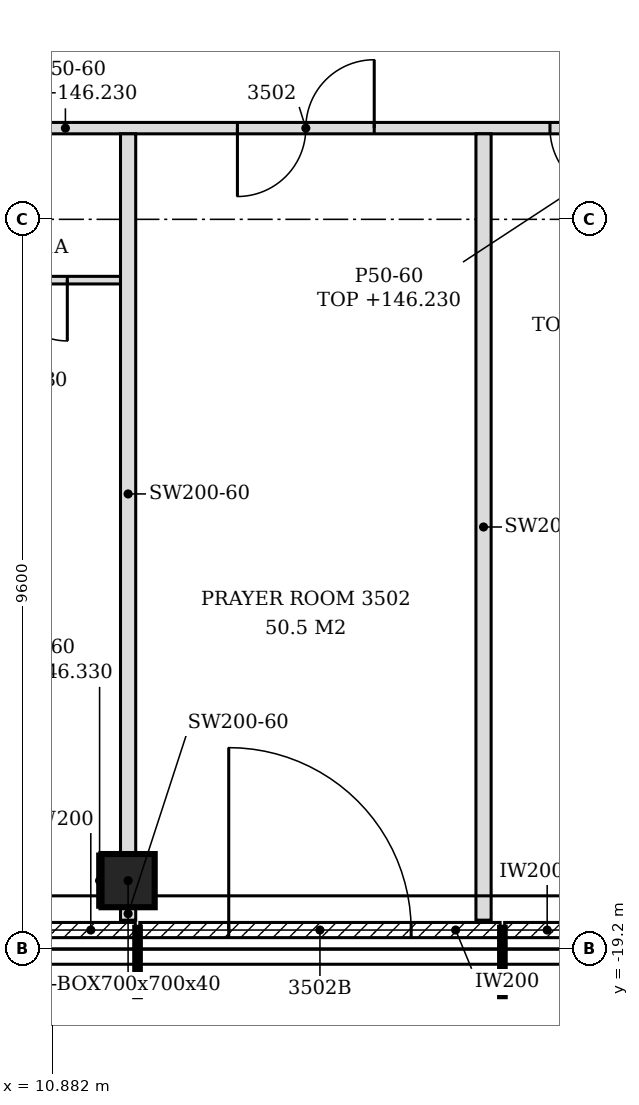
"""IFC4 building model, lengths in metres.
Left out: names, types, materials, properties, quantities, classifications, styles, units other than length and angle.
Written with IfcOpenShell. Run it as: python <this file> out.ifc"""

import sys

from ifc_helpers import new_model, si_unit, direction, frame, frame_2d, origin, origin_2d, place, context, subcontext, project, spatial, polyline, rectangle, hollow_rectangle, outline, extrude, element, fill, save


model = new_model("IFC4")
c1 = context("Model", 3, precision=1e-05, world=origin(), true_north=direction((0.0, 1.0)))
c2 = subcontext(c1, "Body", "Model", "MODEL_VIEW")
j1 = project(units=[si_unit("LENGTHUNIT", "METRE"), si_unit("PLANEANGLEUNIT", "RADIAN")], contexts=[c1])
p1 = place(None, origin())
s1 = spatial("IfcSite", under=j1, at=p1, CompositionType="ELEMENT")
p2 = place(p1, origin())
s2 = spatial("IfcBuilding", under=s1, at=p2, CompositionType="ELEMENT")
p3 = place(p2, frame((0.0, 0.0, 143.4)))
s3 = spatial("IfcBuildingStorey", under=s2, at=p3, CompositionType="ELEMENT", Elevation=143.4)
p4 = place(p3, frame((11.876, -18.3, -0.15), z_axis=(0.0, 0.0, 1.0), x_axis=(1.0, 0.0, 0.0)))
e1 = element("IfcColumn", 1, at=p4, inside=s3, PredefinedType="COLUMN", context=c2, shape_type="SweptSolid", body=[
    extrude(hollow_rectangle(XDim=0.7, YDim=0.7, WallThickness=0.04, at=origin_2d()), origin(), (0.0, 0.0, 1.0), 3.6),
])
p5 = place(p3, frame((7.23, -18.95, 0.0), z_axis=(0.0, 0.0, 1.0), x_axis=(1.0, 0.0, 0.0)))
e2 = element("IfcWall", 2, at=p5, inside=s3, PredefinedType="NOTDEFINED", context=c2, shape_type="SweptSolid", body=[
    extrude(rectangle(XDim=4.74, YDim=0.2, at=frame_2d((2.37, 0.0))), origin(), (0.0, 0.0, 1.0), 3.45),
])
p6 = place(p5, frame((1.17, 0.0, 0.0)))
e3 = element("IfcOpeningElement", 3, at=p6, cuts=e2, PredefinedType="OPENING", context=c2, shape_type="SweptSolid", body=[
    extrude(rectangle(XDim=2.4, YDim=2.4, at=frame_2d((1.2, 1.2))), frame((0.0, 0.11, 0.0), z_axis=(0.0, -1.0, 0.0), x_axis=(1.0, 0.0, 0.0)), (0.0, 0.0, 1.0), 0.22),
])
p7 = place(p3, frame((12.03, -18.95, 0.0), z_axis=(0.0, 0.0, 1.0), x_axis=(1.0, 0.0, 0.0)))
e4 = element("IfcWall", 4, at=p7, inside=s3, PredefinedType="NOTDEFINED", context=c2, shape_type="SweptSolid", body=[
    extrude(rectangle(XDim=4.74, YDim=0.2, at=frame_2d((2.37, 0.0))), origin(), (0.0, 0.0, 1.0), 3.45),
])
p8 = place(p7, frame((1.17, 0.0, 0.0)))
e5 = element("IfcOpeningElement", 5, at=p8, cuts=e4, PredefinedType="OPENING", context=c2, shape_type="SweptSolid", body=[
    extrude(rectangle(XDim=2.4, YDim=2.4, at=frame_2d((1.2, 1.2))), frame((0.0, 0.11, 0.0), z_axis=(0.0, -1.0, 0.0), x_axis=(1.0, 0.0, 0.0)), (0.0, 0.0, 1.0), 0.22),
])
p9 = place(p3, frame((16.83, -18.95, 0.0), z_axis=(0.0, 0.0, 1.0), x_axis=(1.0, 0.0, 0.0)))
e6 = element("IfcWall", 6, at=p9, inside=s3, PredefinedType="NOTDEFINED", context=c2, shape_type="SweptSolid", body=[
    extrude(rectangle(XDim=4.626, YDim=0.2, at=frame_2d((2.313, 0.0))), origin(), (0.0, 0.0, 1.0), 3.45),
])
p10 = place(p9, frame((1.118, 0.0, 0.0)))
e7 = element("IfcOpeningElement", 7, at=p10, cuts=e6, PredefinedType="OPENING", context=c2, shape_type="SweptSolid", body=[
    extrude(rectangle(XDim=2.4, YDim=2.4, at=frame_2d((1.2, 1.2))), frame((0.0, 0.11, 0.0), z_axis=(0.0, -1.0, 0.0), x_axis=(1.0, 0.0, 0.0)), (0.0, 0.0, 1.0), 0.22),
])
p11 = place(p3, frame((11.876, -18.82, 0.0), z_axis=(0.0, 0.0, 1.0), x_axis=(0.0, 1.0, 0.0)))
e8 = element("IfcWall", 8, at=p11, inside=s3, PredefinedType="PARTITIONING", context=c2, shape_type="SweptSolid", body=[
    extrude(rectangle(XDim=0.17, YDim=0.2, at=frame_2d((0.085, 0.0))), origin(), (0.0, 0.0, 1.0), 3.45),
])
p12 = place(p3, frame((16.552, -18.82, 0.0), z_axis=(0.0, 0.0, 1.0), x_axis=(0.0, 1.0, 0.0)))
e9 = element("IfcWall", 9, at=p12, inside=s3, PredefinedType="PARTITIONING", context=c2, shape_type="SweptSolid", body=[
    extrude(outline(polyline([(0.0, 0.0), (10.345, 0.0), (10.345, 2.83), (10.27, 2.83), (10.268, 3.45), (4.525, 3.45), (4.523, 2.88), (4.315, 2.88), (4.313, 3.45), (0.67, 3.45), (0.668, 2.93), (0.37, 2.93), (0.368, 3.45), (0.0, 3.45), (0.0, 0.0)])), frame((0.0, 0.1, 0.0), z_axis=(0.0, -1.0, 0.0), x_axis=(1.0, 0.0, 0.0)), (0.0, 0.0, 1.0), 0.2),
])
p13 = place(p3, frame((11.876, -17.95, 0.0), z_axis=(0.0, 0.0, 1.0), x_axis=(0.0, 1.0, 0.0)))
e10 = element("IfcWall", 10, at=p13, inside=s3, PredefinedType="PARTITIONING", context=c2, shape_type="SweptSolid", body=[
    extrude(outline(polyline([(0.0, 0.0), (9.475, 0.0), (9.475, 2.83), (9.4, 2.83), (9.398, 3.45), (3.655, 3.45), (3.653, 2.88), (3.445, 2.88), (3.443, 3.45), (0.0, 3.45), (0.0, 0.0)])), frame((0.0, 0.1, 0.0), z_axis=(0.0, -1.0, 0.0), x_axis=(1.0, 0.0, 0.0)), (0.0, 0.0, 1.0), 0.2),
])
p14 = place(p3, frame((9.426, -10.4, 0.0), z_axis=(0.0, 0.0, 1.0), x_axis=(1.0, 0.0, 0.0)))
e11 = element("IfcWall", 11, at=p14, inside=s3, PredefinedType="PARTITIONING", context=c2, shape_type="SweptSolid", body=[
    extrude(rectangle(XDim=2.35, YDim=0.1, at=frame_2d((1.175, 0.0))), origin(), (0.0, 0.0, 1.0), 3.45),
])
p15 = place(p14, frame((0.85, 0.0, 0.0)))
e12 = element("IfcOpeningElement", 12, at=p15, cuts=e11, PredefinedType="OPENING", context=c2, shape_type="SweptSolid", body=[
    extrude(rectangle(XDim=0.8, YDim=2.1, at=frame_2d((0.4, 1.05))), frame((0.0, 0.06, 0.0), z_axis=(0.0, -1.0, 0.0), x_axis=(1.0, 0.0, 0.0)), (0.0, 0.0, 1.0), 0.12),
])
p16 = place(p3, frame((7.405, -8.4, 0.0), z_axis=(0.0, 0.0, 1.0), x_axis=(1.0, 0.0, 0.0)))
e13 = element("IfcWall", 13, at=p16, inside=s3, PredefinedType="PARTITIONING", context=c2, shape_type="SweptSolid", body=[
    extrude(rectangle(XDim=11.591, YDim=0.15, at=frame_2d((5.795, 0.0))), origin(), (0.0, 0.0, 1.0), 2.83),
])
p17 = place(p16, frame((0.483, 0.0, 0.0)))
e14 = element("IfcOpeningElement", 14, at=p17, cuts=e13, PredefinedType="OPENING", context=c2, shape_type="SweptSolid", body=[
    extrude(rectangle(XDim=0.9, YDim=2.1, at=frame_2d((0.45, 1.05))), frame((0.0, 0.085, 0.0), z_axis=(0.0, -1.0, 0.0), x_axis=(1.0, 0.0, 0.0)), (0.0, 0.0, 1.0), 0.17),
])
p18 = place(p16, frame((5.909, 0.0, 0.0)))
e15 = element("IfcOpeningElement", 15, at=p18, cuts=e13, PredefinedType="OPENING", context=c2, shape_type="SweptSolid", body=[
    extrude(rectangle(XDim=1.8, YDim=2.1, at=frame_2d((0.9, 1.05))), frame((0.0, 0.085, 0.0), z_axis=(0.0, -1.0, 0.0), x_axis=(1.0, 0.0, 0.0)), (0.0, 0.0, 1.0), 0.17),
])
p19 = place(p16, frame((10.021, 0.0, 0.0)))
e16 = element("IfcOpeningElement", 16, at=p19, cuts=e13, PredefinedType="OPENING", context=c2, shape_type="SweptSolid", body=[
    extrude(rectangle(XDim=0.9, YDim=2.1, at=frame_2d((0.45, 1.05))), frame((0.0, 0.085, 0.0), z_axis=(0.0, -1.0, 0.0), x_axis=(1.0, 0.0, 0.0)), (0.0, 0.0, 1.0), 0.17),
])
p20 = place(p3, frame((11.501, -18.65, 0.0), z_axis=(0.0, 0.0, 1.0), x_axis=(0.0, 1.0, 0.0)))
e17 = element("IfcWall", 17, at=p20, inside=s3, PredefinedType="PARTITIONING", context=c2, shape_type="SweptSolid", body=[
    extrude(rectangle(XDim=0.7, YDim=0.05, at=frame_2d((0.35, 0.0))), origin(), (0.0, 0.0, 1.0), 2.93),
])
p21 = place(p8, origin())
e18 = element("IfcDoor", 18, at=p21, inside=s3, OperationType="SINGLE_SWING_LEFT", PredefinedType="DOOR", context=c2, shape_type="SweptSolid", body=[
    extrude(rectangle(XDim=2.4, YDim=2.4, at=frame_2d((1.2, 1.2))), frame((0.0, 0.025, 0.0), z_axis=(0.0, -1.0, 0.0), x_axis=(1.0, 0.0, 0.0)), (0.0, 0.0, 1.0), 0.05),
])
fill(e5, e18)
p22 = place(p15, frame((0.8, 0.0, 0.0), z_axis=(0.0, 0.0, 1.0), x_axis=(-1.0, 0.0, 0.0)))
e19 = element("IfcDoor", 19, at=p22, inside=s3, OperationType="SINGLE_SWING_LEFT", PredefinedType="DOOR", context=c2, shape_type="SweptSolid", body=[
    extrude(rectangle(XDim=0.8, YDim=2.1, at=frame_2d((0.4, 1.05))), frame((0.0, 0.025, 0.0), z_axis=(0.0, -1.0, 0.0), x_axis=(1.0, 0.0, 0.0)), (0.0, 0.0, 1.0), 0.05),
])
fill(e12, e19)
p23 = place(p18, frame((1.8, 0.0, 0.0), z_axis=(0.0, 0.0, 1.0), x_axis=(-1.0, 0.0, 0.0)))
e20 = element("IfcDoor", 20, at=p23, inside=s3, OperationType="DOUBLE_DOOR_SINGLE_SWING", PredefinedType="DOOR", context=c2, shape_type="SweptSolid", body=[
    extrude(rectangle(XDim=1.8, YDim=2.1, at=frame_2d((0.9, 1.05))), frame((0.0, 0.025, 0.0), z_axis=(0.0, -1.0, 0.0), x_axis=(1.0, 0.0, 0.0)), (0.0, 0.0, 1.0), 0.05),
])
fill(e15, e20)
p24 = place(p19, frame((0.9, 0.0, 0.0), z_axis=(0.0, 0.0, 1.0), x_axis=(-1.0, 0.0, 0.0)))
e21 = element("IfcDoor", 21, at=p24, inside=s3, OperationType="SINGLE_SWING_LEFT", PredefinedType="DOOR", context=c2, shape_type="SweptSolid", body=[
    extrude(rectangle(XDim=0.9, YDim=2.1, at=frame_2d((0.45, 1.05))), frame((0.0, 0.025, 0.0), z_axis=(0.0, -1.0, 0.0), x_axis=(1.0, 0.0, 0.0)), (0.0, 0.0, 1.0), 0.05),
])
fill(e16, e21)
save(model, sys.argv[1])
